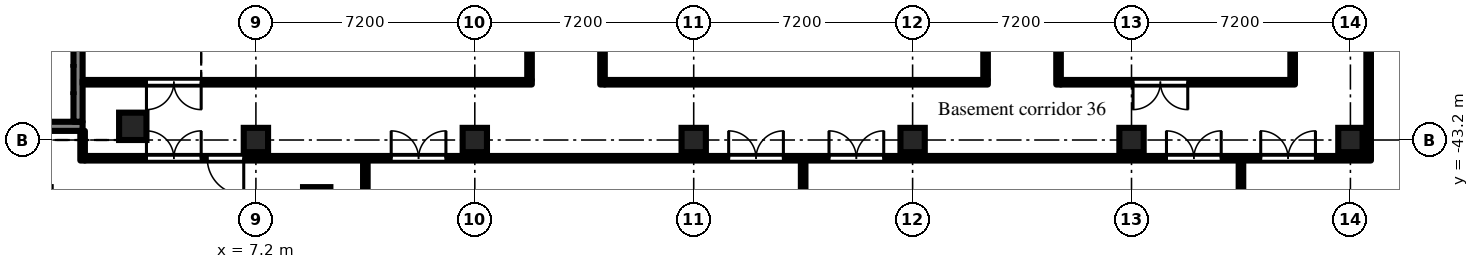
"""IFC4 building model, lengths in metres.
Left out: names, types, materials, properties, quantities, classifications, styles, units other than length and angle.
Written with IfcOpenShell. Run it as: python <this file> out.ifc"""

import sys

from ifc_helpers import new_model, si_unit, direction, frame, frame_2d, origin, origin_2d, place, context, subcontext, project, spatial, rectangle, extrude, element, fill, save


model = new_model("IFC4")
c1 = context("Model", 3, precision=1e-05, world=origin(), true_north=direction((0.0, 1.0)))
c2 = subcontext(c1, "Body", "Model", "MODEL_VIEW")
j1 = project(units=[si_unit("LENGTHUNIT", "METRE"), si_unit("PLANEANGLEUNIT", "RADIAN")], contexts=[c1])
p1 = place(None, origin())
s1 = spatial("IfcSite", under=j1, at=p1, CompositionType="ELEMENT")
p2 = place(p1, origin())
s2 = spatial("IfcBuilding", under=s1, at=p2, CompositionType="ELEMENT")
p3 = place(p2, frame((0.0, 0.0, -4.8)))
s3 = spatial("IfcBuildingStorey", under=s2, at=p3, CompositionType="ELEMENT", Elevation=-4.8)
p4 = place(p3, frame((3.15, -42.75, -0.5), z_axis=(0.0, 0.0, 1.0), x_axis=(1.0, 0.0, 0.0)))
e1 = element("IfcColumn", 1, at=p4, inside=s3, PredefinedType="COLUMN", context=c2, shape_type="SweptSolid", body=[
    extrude(rectangle(XDim=0.9, YDim=0.9, at=origin_2d()), origin(), (0.0, 0.0, 1.0), 5.3),
])
for number, where, z_axis, x_axis in (
    (2, (7.2, -43.2, -0.5), (0.0, 0.0, 1.0), (1.0, 0.0, 0.0)),
    (3, (14.4, -43.2, -0.5), (0.0, 0.0, 1.0), (1.0, 0.0, 0.0)),
    (4, (21.6, -43.2, -0.5), (0.0, 0.0, 1.0), (1.0, 0.0, 0.0)),
    (5, (28.8, -43.2, -0.5), (0.0, 0.0, 1.0), (1.0, 0.0, 0.0)),
    (6, (36.0, -43.2, -0.5), (0.0, 0.0, 1.0), (1.0, 0.0, 0.0)),
    (7, (43.2, -43.2, -0.5), (0.0, 0.0, 1.0), (1.0, 0.0, 0.0)),
):
    element("IfcColumn", number, at=place(p3, frame(where, z_axis=z_axis, x_axis=x_axis)), inside=s3, PredefinedType="COLUMN", context=c2, shape_type="SweptSolid", body=[
        extrude(rectangle(XDim=0.8, YDim=0.8, at=origin_2d()), origin(), (0.0, 0.0, 1.0), 5.3),
    ])
p5 = place(p3, frame((9.2, -45.2, -0.5), z_axis=(0.0, 0.0, 1.0), x_axis=(1.0, 0.0, 0.0)))
e8 = element("IfcColumn", 8, at=p5, inside=s3, PredefinedType="COLUMN", context=c2, shape_type="SweptSolid", body=[
    extrude(rectangle(XDim=0.9, YDim=0.9, at=origin_2d()), origin(), (0.0, 0.0, 1.0), 5.3),
])
p6 = place(p3, frame((-1.5, -42.75, 0.0), z_axis=(0.0, 0.0, 1.0), x_axis=(1.0, 0.0, 0.0)))
e9 = element("IfcWall", 9, at=p6, inside=s3, PredefinedType="SHEAR", context=c2, shape_type="SweptSolid", body=[
    extrude(rectangle(XDim=3.0, YDim=0.3, at=frame_2d((1.5, 0.0))), origin(), (0.0, 0.0, 1.0), 4.35),
])
p7 = place(p3, frame((1.35, -36.8, 0.0), z_axis=(0.0, 0.0, 1.0), x_axis=(0.0, -1.0, 0.0)))
e10 = element("IfcWall", 10, at=p7, inside=s3, PredefinedType="SHEAR", context=c2, shape_type="SweptSolid", body=[
    extrude(rectangle(XDim=5.8, YDim=0.3, at=frame_2d((2.9, 0.0))), origin(), (0.0, 0.0, 1.0), 4.35),
])
p8 = place(p3, frame((1.5, -43.875, 0.0), z_axis=(0.0, 0.0, 1.0), x_axis=(0.0, 1.0, 0.0)))
e11 = element("IfcWall", 11, at=p8, inside=s3, PredefinedType="PARTITIONING", context=c2, shape_type="SweptSolid", body=[
    extrude(rectangle(XDim=0.975, YDim=0.15, at=frame_2d((0.488, 0.0))), origin(), (0.0, 0.0, 1.0), 4.35),
])
p9 = place(p3, frame((1.575, -43.8, 0.0), z_axis=(0.0, 0.0, 1.0), x_axis=(1.0, 0.0, 0.0)))
e12 = element("IfcWall", 12, at=p9, inside=s3, PredefinedType="PARTITIONING", context=c2, shape_type="SweptSolid", body=[
    extrude(rectangle(XDim=42.3, YDim=0.15, at=frame_2d((21.15, 0.0))), origin(), (0.0, 0.0, 1.0), 4.35),
])
p10 = place(p9, frame((38.675, 0.0, 0.0)))
e13 = element("IfcOpeningElement", 13, at=p10, cuts=e12, PredefinedType="OPENING", context=c2, shape_type="SweptSolid", body=[
    extrude(rectangle(XDim=1.8, YDim=2.1, at=frame_2d((0.9, 1.05))), frame((0.0, 0.085, 0.0), z_axis=(0.0, -1.0, 0.0), x_axis=(1.0, 0.0, 0.0)), (0.0, 0.0, 1.0), 0.17),
])
p11 = place(p9, frame((2.025, 0.0, 0.0)))
e14 = element("IfcOpeningElement", 14, at=p11, cuts=e12, PredefinedType="OPENING", context=c2, shape_type="SweptSolid", body=[
    extrude(rectangle(XDim=1.8, YDim=2.1, at=frame_2d((0.9, 1.05))), frame((0.0, 0.085, 0.0), z_axis=(0.0, -1.0, 0.0), x_axis=(1.0, 0.0, 0.0)), (0.0, 0.0, 1.0), 0.17),
])
p12 = place(p9, frame((4.025, 0.0, 0.0)))
e15 = element("IfcOpeningElement", 15, at=p12, cuts=e12, PredefinedType="OPENING", context=c2, shape_type="SweptSolid", body=[
    extrude(rectangle(XDim=1.2, YDim=2.1, at=frame_2d((0.6, 1.05))), frame((0.0, 0.085, 0.0), z_axis=(0.0, -1.0, 0.0), x_axis=(1.0, 0.0, 0.0)), (0.0, 0.0, 1.0), 0.17),
])
p13 = place(p9, frame((10.075, 0.0, 0.0)))
e16 = element("IfcOpeningElement", 16, at=p13, cuts=e12, PredefinedType="OPENING", context=c2, shape_type="SweptSolid", body=[
    extrude(rectangle(XDim=1.8, YDim=2.1, at=frame_2d((0.9, 1.05))), frame((0.0, 0.085, 0.0), z_axis=(0.0, -1.0, 0.0), x_axis=(1.0, 0.0, 0.0)), (0.0, 0.0, 1.0), 0.17),
])
p14 = place(p9, frame((21.175, 0.0, 0.0)))
e17 = element("IfcOpeningElement", 17, at=p14, cuts=e12, PredefinedType="OPENING", context=c2, shape_type="SweptSolid", body=[
    extrude(rectangle(XDim=1.8, YDim=2.1, at=frame_2d((0.9, 1.05))), frame((0.0, 0.085, 0.0), z_axis=(0.0, -1.0, 0.0), x_axis=(1.0, 0.0, 0.0)), (0.0, 0.0, 1.0), 0.17),
])
p15 = place(p9, frame((24.475, 0.0, 0.0)))
e18 = element("IfcOpeningElement", 18, at=p15, cuts=e12, PredefinedType="OPENING", context=c2, shape_type="SweptSolid", body=[
    extrude(rectangle(XDim=1.8, YDim=2.1, at=frame_2d((0.9, 1.05))), frame((0.0, 0.085, 0.0), z_axis=(0.0, -1.0, 0.0), x_axis=(1.0, 0.0, 0.0)), (0.0, 0.0, 1.0), 0.17),
])
p16 = place(p9, frame((35.575, 0.0, 0.0)))
e19 = element("IfcOpeningElement", 19, at=p16, cuts=e12, PredefinedType="OPENING", context=c2, shape_type="SweptSolid", body=[
    extrude(rectangle(XDim=1.8, YDim=2.1, at=frame_2d((0.9, 1.05))), frame((0.0, 0.085, 0.0), z_axis=(0.0, -1.0, 0.0), x_axis=(1.0, 0.0, 0.0)), (0.0, 0.0, 1.0), 0.17),
])
p17 = place(p3, frame((1.5, -41.3, 0.0), z_axis=(0.0, 0.0, 1.0), x_axis=(1.0, 0.0, 0.0)))
e20 = element("IfcWall", 20, at=p17, inside=s3, PredefinedType="PARTITIONING", context=c2, shape_type="SweptSolid", body=[
    extrude(rectangle(XDim=14.775, YDim=0.15, at=frame_2d((7.387, 0.0))), origin(), (0.0, 0.0, 1.0), 4.35),
])
p18 = place(p17, frame((2.1, 0.0, 0.0)))
e21 = element("IfcOpeningElement", 21, at=p18, cuts=e20, PredefinedType="OPENING", context=c2, shape_type="SweptSolid", body=[
    extrude(rectangle(XDim=1.8, YDim=2.1, at=frame_2d((0.9, 1.05))), frame((0.0, 0.085, 0.0), z_axis=(0.0, -1.0, 0.0), x_axis=(1.0, 0.0, 0.0)), (0.0, 0.0, 1.0), 0.17),
])
p19 = place(p3, frame((10.8, -50.22, 0.0), z_axis=(0.0, 0.0, 1.0), x_axis=(0.0, 1.0, 0.0)))
e22 = element("IfcWall", 22, at=p19, inside=s3, PredefinedType="PARTITIONING", context=c2, shape_type="SweptSolid", body=[
    extrude(rectangle(XDim=6.345, YDim=0.15, at=frame_2d((3.172, 0.0))), origin(), (0.0, 0.0, 1.0), 4.35),
])
p20 = place(p3, frame((16.2, -41.225, 0.0), z_axis=(0.0, 0.0, 1.0), x_axis=(0.0, 1.0, 0.0)))
e23 = element("IfcWall", 23, at=p20, inside=s3, PredefinedType="PARTITIONING", context=c2, shape_type="SweptSolid", body=[
    extrude(rectangle(XDim=7.55, YDim=0.15, at=frame_2d((3.775, 0.0))), origin(), (0.0, 0.0, 1.0), 4.35),
])
p21 = place(p20, frame((2.375, 0.0, 0.0)))
e24 = element("IfcOpeningElement", 24, at=p21, cuts=e23, PredefinedType="OPENING", context=c2, shape_type="SweptSolid", body=[
    extrude(rectangle(XDim=1.8, YDim=2.1, at=frame_2d((0.9, 1.05))), frame((0.0, 0.085, 0.0), z_axis=(0.0, -1.0, 0.0), x_axis=(1.0, 0.0, 0.0)), (0.0, 0.0, 1.0), 0.17),
])
p22 = place(p3, frame((18.6, -41.375, 0.0), z_axis=(0.0, 0.0, 1.0), x_axis=(0.0, 1.0, 0.0)))
e25 = element("IfcWall", 25, at=p22, inside=s3, PredefinedType="PARTITIONING", context=c2, shape_type="SweptSolid", body=[
    extrude(rectangle(XDim=7.85, YDim=0.15, at=frame_2d((3.925, 0.0))), origin(), (0.0, 0.0, 1.0), 4.35),
])
p23 = place(p22, frame((3.525, 0.0, 0.0)))
e26 = element("IfcOpeningElement", 26, at=p23, cuts=e25, PredefinedType="OPENING", context=c2, shape_type="SweptSolid", body=[
    extrude(rectangle(XDim=1.8, YDim=2.1, at=frame_2d((0.9, 1.05))), frame((0.0, 0.085, 0.0), z_axis=(0.0, -1.0, 0.0), x_axis=(1.0, 0.0, 0.0)), (0.0, 0.0, 1.0), 0.17),
])
p24 = place(p3, frame((18.675, -41.3, 0.0), z_axis=(0.0, 0.0, 1.0), x_axis=(1.0, 0.0, 0.0)))
e27 = element("IfcWall", 27, at=p24, inside=s3, PredefinedType="PARTITIONING", context=c2, shape_type="SweptSolid", body=[
    extrude(rectangle(XDim=12.6, YDim=0.15, at=frame_2d((6.3, 0.0))), origin(), (0.0, 0.0, 1.0), 4.35),
])
p25 = place(p3, frame((25.2, -50.22, 0.0), z_axis=(0.0, 0.0, 1.0), x_axis=(0.0, 1.0, 0.0)))
e28 = element("IfcWall", 28, at=p25, inside=s3, PredefinedType="PARTITIONING", context=c2, shape_type="SweptSolid", body=[
    extrude(rectangle(XDim=6.345, YDim=0.15, at=frame_2d((3.172, 0.0))), origin(), (0.0, 0.0, 1.0), 4.35),
])
p26 = place(p3, frame((31.2, -41.225, 0.0), z_axis=(0.0, 0.0, 1.0), x_axis=(0.0, 1.0, 0.0)))
e29 = element("IfcWall", 29, at=p26, inside=s3, PredefinedType="PARTITIONING", context=c2, shape_type="SweptSolid", body=[
    extrude(rectangle(XDim=7.55, YDim=0.15, at=frame_2d((3.775, 0.0))), origin(), (0.0, 0.0, 1.0), 4.35),
])
p27 = place(p26, frame((2.375, 0.0, 0.0)))
e30 = element("IfcOpeningElement", 30, at=p27, cuts=e29, PredefinedType="OPENING", context=c2, shape_type="SweptSolid", body=[
    extrude(rectangle(XDim=1.8, YDim=2.1, at=frame_2d((0.9, 1.05))), frame((0.0, 0.085, 0.0), z_axis=(0.0, -1.0, 0.0), x_axis=(1.0, 0.0, 0.0)), (0.0, 0.0, 1.0), 0.17),
])
p28 = place(p3, frame((33.6, -41.375, 0.0), z_axis=(0.0, 0.0, 1.0), x_axis=(0.0, 1.0, 0.0)))
e31 = element("IfcWall", 31, at=p28, inside=s3, PredefinedType="PARTITIONING", context=c2, shape_type="SweptSolid", body=[
    extrude(rectangle(XDim=7.85, YDim=0.15, at=frame_2d((3.925, 0.0))), origin(), (0.0, 0.0, 1.0), 4.35),
])
p29 = place(p3, frame((33.675, -41.3, 0.0), z_axis=(0.0, 0.0, 1.0), x_axis=(1.0, 0.0, 0.0)))
e32 = element("IfcWall", 32, at=p29, inside=s3, PredefinedType="PARTITIONING", context=c2, shape_type="SweptSolid", body=[
    extrude(rectangle(XDim=7.7, YDim=0.15, at=frame_2d((3.85, 0.0))), origin(), (0.0, 0.0, 1.0), 4.35),
])
p30 = place(p29, frame((2.375, 0.0, 0.0)))
e33 = element("IfcOpeningElement", 33, at=p30, cuts=e32, PredefinedType="OPENING", context=c2, shape_type="SweptSolid", body=[
    extrude(rectangle(XDim=1.8, YDim=2.1, at=frame_2d((0.9, 1.05))), frame((0.0, 0.085, 0.0), z_axis=(0.0, -1.0, 0.0), x_axis=(1.0, 0.0, 0.0)), (0.0, 0.0, 1.0), 0.17),
])
p31 = place(p3, frame((39.6, -50.22, 0.0), z_axis=(0.0, 0.0, 1.0), x_axis=(0.0, 1.0, 0.0)))
e34 = element("IfcWall", 34, at=p31, inside=s3, PredefinedType="PARTITIONING", context=c2, shape_type="SweptSolid", body=[
    extrude(rectangle(XDim=6.345, YDim=0.15, at=frame_2d((3.172, 0.0))), origin(), (0.0, 0.0, 1.0), 4.35),
])
p32 = place(p3, frame((41.3, -41.225, 0.0), z_axis=(0.0, 0.0, 1.0), x_axis=(0.0, 1.0, 0.0)))
e35 = element("IfcWall", 35, at=p32, inside=s3, PredefinedType="PARTITIONING", context=c2, shape_type="SweptSolid", body=[
    extrude(rectangle(XDim=7.55, YDim=0.15, at=frame_2d((3.775, 0.0))), origin(), (0.0, 0.0, 1.0), 4.35),
])
p33 = place(p3, frame((43.8, -43.725, 0.0), z_axis=(0.0, 0.0, 1.0), x_axis=(0.0, 1.0, 0.0)))
e36 = element("IfcWall", 36, at=p33, inside=s3, PredefinedType="PARTITIONING", context=c2, shape_type="SweptSolid", body=[
    extrude(rectangle(XDim=10.2, YDim=0.15, at=frame_2d((5.1, 0.0))), origin(), (0.0, 0.0, 1.0), 4.35),
])
p34 = place(p33, frame((4.975, 0.0, 0.0)))
e37 = element("IfcOpeningElement", 37, at=p34, cuts=e36, PredefinedType="OPENING", context=c2, shape_type="SweptSolid", body=[
    extrude(rectangle(XDim=1.8, YDim=2.1, at=frame_2d((0.9, 1.05))), frame((0.0, 0.085, 0.0), z_axis=(0.0, -1.0, 0.0), x_axis=(1.0, 0.0, 0.0)), (0.0, 0.0, 1.0), 0.17),
])
p35 = place(p18, frame((1.8, 0.0, 0.0), z_axis=(0.0, 0.0, 1.0), x_axis=(-1.0, 0.0, 0.0)))
e38 = element("IfcDoor", 38, at=p35, inside=s3, OperationType="DOUBLE_DOOR_DOUBLE_SWING", PredefinedType="DOOR", context=c2, shape_type="SweptSolid", body=[
    extrude(rectangle(XDim=1.8, YDim=2.1, at=frame_2d((0.9, 1.05))), frame((0.0, 0.025, 0.0), z_axis=(0.0, -1.0, 0.0), x_axis=(1.0, 0.0, 0.0)), (0.0, 0.0, 1.0), 0.05),
])
fill(e21, e38)
p36 = place(p30, frame((1.8, 0.0, 0.0), z_axis=(0.0, 0.0, 1.0), x_axis=(-1.0, 0.0, 0.0)))
e39 = element("IfcDoor", 39, at=p36, inside=s3, OperationType="DOUBLE_DOOR_DOUBLE_SWING", PredefinedType="DOOR", context=c2, shape_type="SweptSolid", body=[
    extrude(rectangle(XDim=1.8, YDim=2.1, at=frame_2d((0.9, 1.05))), frame((0.0, 0.025, 0.0), z_axis=(0.0, -1.0, 0.0), x_axis=(1.0, 0.0, 0.0)), (0.0, 0.0, 1.0), 0.05),
])
fill(e33, e39)
p37 = place(p10, origin())
e40 = element("IfcDoor", 40, at=p37, inside=s3, OperationType="DOUBLE_DOOR_DOUBLE_SWING", PredefinedType="DOOR", context=c2, shape_type="SweptSolid", body=[
    extrude(rectangle(XDim=1.8, YDim=2.1, at=frame_2d((0.9, 1.05))), frame((0.0, 0.025, 0.0), z_axis=(0.0, -1.0, 0.0), x_axis=(1.0, 0.0, 0.0)), (0.0, 0.0, 1.0), 0.05),
])
fill(e13, e40)
p38 = place(p11, origin())
e41 = element("IfcDoor", 41, at=p38, inside=s3, OperationType="DOUBLE_DOOR_DOUBLE_SWING", PredefinedType="DOOR", context=c2, shape_type="SweptSolid", body=[
    extrude(rectangle(XDim=1.8, YDim=2.1, at=frame_2d((0.9, 1.05))), frame((0.0, 0.025, 0.0), z_axis=(0.0, -1.0, 0.0), x_axis=(1.0, 0.0, 0.0)), (0.0, 0.0, 1.0), 0.05),
])
fill(e14, e41)
p39 = place(p12, frame((1.2, 0.0, 0.0), z_axis=(0.0, 0.0, 1.0), x_axis=(-1.0, 0.0, 0.0)))
e42 = element("IfcDoor", 42, at=p39, inside=s3, OperationType="SINGLE_SWING_LEFT", PredefinedType="DOOR", context=c2, shape_type="SweptSolid", body=[
    extrude(rectangle(XDim=1.2, YDim=2.1, at=frame_2d((0.6, 1.05))), frame((0.0, 0.025, 0.0), z_axis=(0.0, -1.0, 0.0), x_axis=(1.0, 0.0, 0.0)), (0.0, 0.0, 1.0), 0.05),
])
fill(e15, e42)
p40 = place(p13, origin())
e43 = element("IfcDoor", 43, at=p40, inside=s3, OperationType="DOUBLE_DOOR_DOUBLE_SWING", PredefinedType="DOOR", context=c2, shape_type="SweptSolid", body=[
    extrude(rectangle(XDim=1.8, YDim=2.1, at=frame_2d((0.9, 1.05))), frame((0.0, 0.025, 0.0), z_axis=(0.0, -1.0, 0.0), x_axis=(1.0, 0.0, 0.0)), (0.0, 0.0, 1.0), 0.05),
])
fill(e16, e43)
p41 = place(p14, origin())
e44 = element("IfcDoor", 44, at=p41, inside=s3, OperationType="DOUBLE_DOOR_DOUBLE_SWING", PredefinedType="DOOR", context=c2, shape_type="SweptSolid", body=[
    extrude(rectangle(XDim=1.8, YDim=2.1, at=frame_2d((0.9, 1.05))), frame((0.0, 0.025, 0.0), z_axis=(0.0, -1.0, 0.0), x_axis=(1.0, 0.0, 0.0)), (0.0, 0.0, 1.0), 0.05),
])
fill(e17, e44)
p42 = place(p15, origin())
e45 = element("IfcDoor", 45, at=p42, inside=s3, OperationType="DOUBLE_DOOR_DOUBLE_SWING", PredefinedType="DOOR", context=c2, shape_type="SweptSolid", body=[
    extrude(rectangle(XDim=1.8, YDim=2.1, at=frame_2d((0.9, 1.05))), frame((0.0, 0.025, 0.0), z_axis=(0.0, -1.0, 0.0), x_axis=(1.0, 0.0, 0.0)), (0.0, 0.0, 1.0), 0.05),
])
fill(e18, e45)
p43 = place(p16, origin())
e46 = element("IfcDoor", 46, at=p43, inside=s3, OperationType="DOUBLE_DOOR_DOUBLE_SWING", PredefinedType="DOOR", context=c2, shape_type="SweptSolid", body=[
    extrude(rectangle(XDim=1.8, YDim=2.1, at=frame_2d((0.9, 1.05))), frame((0.0, 0.025, 0.0), z_axis=(0.0, -1.0, 0.0), x_axis=(1.0, 0.0, 0.0)), (0.0, 0.0, 1.0), 0.05),
])
fill(e19, e46)
save(model, sys.argv[1])
